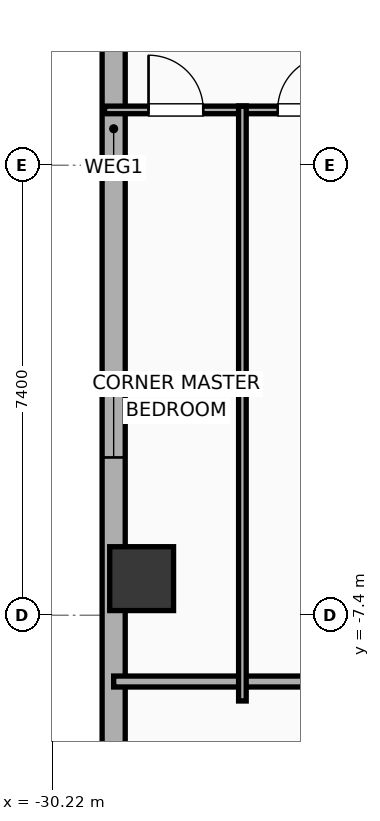
"""IFC4 building model, lengths in metres.
Left out: names, types, materials, properties, quantities, classifications, styles, units other than length and angle.
Written with IfcOpenShell. Run it as: python <this file> out.ifc"""

import sys

from ifc_helpers import new_model, si_unit, direction, frame, frame_2d, origin, origin_2d, place, context, subcontext, project, spatial, rectangle, hollow_rectangle, extrude, element, fill, save


model = new_model("IFC4")
c1 = context("Model", 3, precision=1e-05, world=origin(), true_north=direction((0.0, 1.0)))
c2 = subcontext(c1, "Body", "Model", "MODEL_VIEW")
j1 = project(units=[si_unit("LENGTHUNIT", "METRE"), si_unit("PLANEANGLEUNIT", "RADIAN")], contexts=[c1])
p1 = place(None, origin())
s1 = spatial("IfcSite", under=j1, at=p1, CompositionType="ELEMENT")
p2 = place(p1, origin())
s2 = spatial("IfcBuilding", under=s1, at=p2, CompositionType="ELEMENT")
p3 = place(p2, frame((0.0, 0.0, 128.7)))
s3 = spatial("IfcBuildingStorey", under=s2, at=p3, CompositionType="ELEMENT", Elevation=128.7)
p4 = place(p3, frame((-28.75, -6.798, 0.0), z_axis=(0.0, 0.0, 1.0), x_axis=(1.0, 0.0, 0.0)))
e1 = element("IfcColumn", 1, at=p4, inside=s3, PredefinedType="COLUMN", context=c2, shape_type="SweptSolid", body=[
    extrude(hollow_rectangle(XDim=1.05, YDim=1.05, WallThickness=0.036, at=origin_2d()), origin(), (0.0, 0.0, 1.0), 3.9),
])
p5 = place(p3, frame((-29.21, -16.581, 0.0), z_axis=(0.0, 0.0, 1.0), x_axis=(0.0, 1.0, 0.0)))
e2 = element("IfcWall", 2, at=p5, inside=s3, PredefinedType="ELEMENTEDWALL", context=c2, shape_type="SweptSolid", body=[
    extrude(rectangle(XDim=34.363, YDim=0.38, at=frame_2d((17.181, 0.0))), origin(), (0.0, 0.0, 1.0), 3.65),
])
p6 = place(p5, frame((31.087, 0.0, 0.75)))
e3 = element("IfcOpeningElement", 3, at=p6, cuts=e2, PredefinedType="OPENING", context=c2, shape_type="SweptSolid", body=[
    extrude(rectangle(XDim=1.2, YDim=2.05, at=frame_2d((0.6, 1.025))), frame((0.0, 0.2, 0.0), z_axis=(0.0, -1.0, 0.0), x_axis=(1.0, 0.0, 0.0)), (0.0, 0.0, 1.0), 0.4),
])
p7 = place(p5, frame((20.326, 0.0, 0.75)))
e4 = element("IfcOpeningElement", 4, at=p7, cuts=e2, PredefinedType="OPENING", context=c2, shape_type="SweptSolid", body=[
    extrude(rectangle(XDim=1.2, YDim=2.05, at=frame_2d((0.6, 1.025))), frame((0.0, 0.2, 0.0), z_axis=(0.0, -1.0, 0.0), x_axis=(1.0, 0.0, 0.0)), (0.0, 0.0, 1.0), 0.4),
])
p8 = place(p5, frame((11.776, 0.0, 0.75)))
e5 = element("IfcOpeningElement", 5, at=p8, cuts=e2, PredefinedType="OPENING", context=c2, shape_type="SweptSolid", body=[
    extrude(rectangle(XDim=1.2, YDim=2.05, at=frame_2d((0.6, 1.025))), frame((0.0, 0.2, 0.0), z_axis=(0.0, -1.0, 0.0), x_axis=(1.0, 0.0, 0.0)), (0.0, 0.0, 1.0), 0.4),
])
p9 = place(p3, frame((-29.21, -8.49, 0.0), z_axis=(0.0, 0.0, 1.0), x_axis=(1.0, 0.0, 0.0)))
e6 = element("IfcWall", 6, at=p9, inside=s3, PredefinedType="PARTITIONING", context=c2, shape_type="SweptSolid", body=[
    extrude(rectangle(XDim=19.33, YDim=0.18, at=frame_2d((9.665, 0.0))), origin(), (0.0, 0.0, 1.0), 3.65),
])
p10 = place(p3, frame((-29.36, 0.91, 0.0), z_axis=(0.0, 0.0, 1.0), x_axis=(1.0, 0.0, 0.0)))
e7 = element("IfcWall", 7, at=p10, inside=s3, PredefinedType="PARTITIONING", context=c2, shape_type="SweptSolid", body=[
    extrude(rectangle(XDim=2.33, YDim=0.125, at=frame_2d((1.165, 0.0))), origin(), (0.0, 0.0, 1.0), 3.65),
])
p11 = place(p10, frame((0.723, 0.0, 0.0)))
e8 = element("IfcOpeningElement", 8, at=p11, cuts=e7, PredefinedType="OPENING", context=c2, shape_type="SweptSolid", body=[
    extrude(rectangle(XDim=0.9, YDim=2.05, at=frame_2d((0.45, 1.025))), frame((0.0, 0.073, 0.0), z_axis=(0.0, -1.0, 0.0), x_axis=(1.0, 0.0, 0.0)), (0.0, 0.0, 1.0), 0.145),
])
p12 = place(p3, frame((-27.156, 0.91, 0.0), z_axis=(0.0, 0.0, 1.0), x_axis=(1.0, 0.0, 0.0)))
e9 = element("IfcWall", 9, at=p12, inside=s3, PredefinedType="PARTITIONING", context=c2, shape_type="SweptSolid", body=[
    extrude(rectangle(XDim=2.186, YDim=0.125, at=frame_2d((1.093, 0.0))), origin(), (0.0, 0.0, 1.0), 3.65),
])
p13 = place(p12, frame((0.643, 0.0, 0.0)))
e10 = element("IfcOpeningElement", 10, at=p13, cuts=e9, PredefinedType="OPENING", context=c2, shape_type="SweptSolid", body=[
    extrude(rectangle(XDim=0.9, YDim=2.05, at=frame_2d((0.45, 1.025))), frame((0.0, 0.073, 0.0), z_axis=(0.0, -1.0, 0.0), x_axis=(1.0, 0.0, 0.0)), (0.0, 0.0, 1.0), 0.145),
])
p14 = place(p3, frame((-27.093, -8.81, 0.0), z_axis=(0.0, 0.0, 1.0), x_axis=(0.0, 1.0, 0.0)))
e11 = element("IfcWall", 11, at=p14, inside=s3, PredefinedType="PARTITIONING", context=c2, shape_type="SweptSolid", body=[
    extrude(rectangle(XDim=9.78, YDim=0.125, at=frame_2d((4.89, 0.0))), origin(), (0.0, 0.0, 1.0), 3.65),
])
p15 = place(p8, origin())
e12 = element("IfcWindow", 12, at=p15, inside=s3, PartitioningType="SINGLE_PANEL", PredefinedType="WINDOW", context=c2, shape_type="SweptSolid", body=[
    extrude(rectangle(XDim=1.2, YDim=2.05, at=frame_2d((0.6, 1.025))), frame((0.0, 0.03, 0.0), z_axis=(0.0, -1.0, 0.0), x_axis=(1.0, 0.0, 0.0)), (0.0, 0.0, 1.0), 0.06),
])
fill(e5, e12)
p16 = place(p11, origin())
e13 = element("IfcDoor", 13, at=p16, inside=s3, OperationType="SINGLE_SWING_LEFT", PredefinedType="DOOR", context=c2, shape_type="SweptSolid", body=[
    extrude(rectangle(XDim=0.9, YDim=2.05, at=frame_2d((0.45, 1.025))), frame((0.0, 0.025, 0.0), z_axis=(0.0, -1.0, 0.0), x_axis=(1.0, 0.0, 0.0)), (0.0, 0.0, 1.0), 0.05),
])
fill(e8, e13)
p17 = place(p13, origin())
e14 = element("IfcDoor", 14, at=p17, inside=s3, OperationType="SINGLE_SWING_RIGHT", PredefinedType="DOOR", context=c2, shape_type="SweptSolid", body=[
    extrude(rectangle(XDim=0.9, YDim=2.05, at=frame_2d((0.45, 1.025))), frame((0.0, 0.025, 0.0), z_axis=(0.0, -1.0, 0.0), x_axis=(1.0, 0.0, 0.0)), (0.0, 0.0, 1.0), 0.05),
])
fill(e10, e14)
save(model, sys.argv[1])
